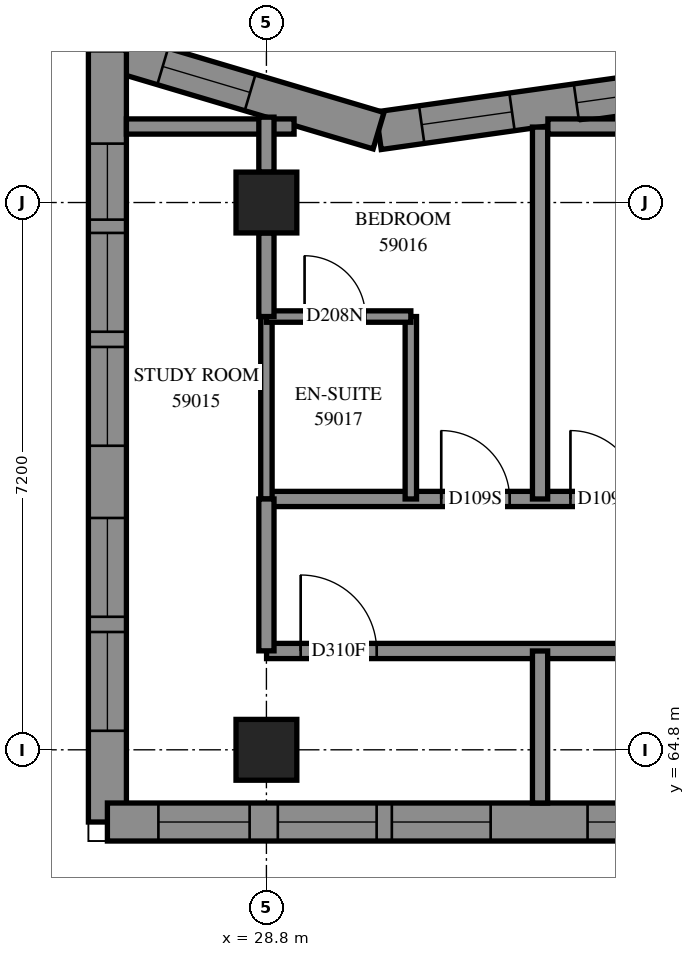
"""IFC4 building model, lengths in metres.
Left out: names, types, materials, properties, quantities, classifications, styles, units other than length and angle.
Written with IfcOpenShell. Run it as: python <this file> out.ifc"""

import sys

from ifc_helpers import new_model, si_unit, direction, frame, frame_2d, origin, origin_2d, place, context, subcontext, project, spatial, polyline, rectangle, outline, extrude, element, fill, save


model = new_model("IFC4")
c1 = context("Model", 3, precision=1e-05, world=origin(), true_north=direction((0.0, 1.0)))
c2 = subcontext(c1, "Body", "Model", "MODEL_VIEW")
j1 = project(units=[si_unit("LENGTHUNIT", "METRE"), si_unit("PLANEANGLEUNIT", "RADIAN")], contexts=[c1])
p1 = place(None, origin())
s1 = spatial("IfcSite", under=j1, at=p1, CompositionType="ELEMENT")
p2 = place(p1, origin())
s2 = spatial("IfcBuilding", under=s1, at=p2, CompositionType="ELEMENT")
p3 = place(p2, frame((0.0, 0.0, 216.8)))
s3 = spatial("IfcBuildingStorey", under=s2, at=p3, CompositionType="ELEMENT", Elevation=216.8)
for number, where, z_axis, x_axis in (
    (1, (28.8, 64.8, 0.0), (0.0, 0.0, 1.0), (1.0, 0.0, 0.0)),
    (2, (28.8, 72.0, 0.0), (0.0, 0.0, 1.0), (1.0, 0.0, 0.0)),
):
    element("IfcColumn", number, at=place(p3, frame(where, z_axis=z_axis, x_axis=x_axis)), inside=s3, PredefinedType="COLUMN", context=c2, shape_type="SweptSolid", body=[
        extrude(rectangle(XDim=0.8, YDim=0.8, at=origin_2d()), origin(), (0.0, 0.0, 1.0), 3.1),
    ])
p4 = place(p3, frame((34.131, 73.49, 0.0), z_axis=(0.0, 0.0, 1.0), x_axis=(-0.9901681239, -0.1398824019, 0.0)))
e3 = element("IfcWall", 3, at=p4, inside=s3, PredefinedType="SOLIDWALL", context=c2, shape_type="SweptSolid", body=[
    extrude(outline(polyline([(-0.035, -0.25), (3.839, -0.25), (3.949, 0.25), (0.035, 0.25), (-0.035, -0.25)])), origin(), (0.0, 0.0, 1.0), 3.1),
])
p5 = place(p4, frame((2.121, 0.0, 0.45)))
e4 = element("IfcOpeningElement", 4, at=p5, cuts=e3, PredefinedType="OPENING", context=c2, shape_type="SweptSolid", body=[
    extrude(rectangle(XDim=1.2, YDim=2.5, at=frame_2d((0.6, 1.25))), frame((0.0, 0.26, 0.0), z_axis=(0.0, -1.0, 0.0), x_axis=(1.0, 0.0, 0.0)), (0.0, 0.0, 1.0), 0.52),
])
p6 = place(p4, frame((0.465, 0.0, 0.45)))
e5 = element("IfcOpeningElement", 5, at=p6, cuts=e3, PredefinedType="OPENING", context=c2, shape_type="SweptSolid", body=[
    extrude(rectangle(XDim=0.8, YDim=2.5, at=frame_2d((0.4, 1.25))), frame((0.0, 0.26, 0.0), z_axis=(0.0, -1.0, 0.0), x_axis=(1.0, 0.0, 0.0)), (0.0, 0.0, 1.0), 0.52),
])
p7 = place(p3, frame((30.276, 72.945, 0.0), z_axis=(0.0, 0.0, 1.0), x_axis=(-0.9584414972, 0.2852891453, 0.0)))
e6 = element("IfcWall", 6, at=p7, inside=s3, PredefinedType="SOLIDWALL", context=c2, shape_type="SweptSolid", body=[
    extrude(outline(polyline([(0.054, -0.25), (4.058, -0.25), (3.387, 0.25), (-0.054, 0.25), (0.054, -0.25)])), origin(), (0.0, 0.0, 1.0), 3.1),
])
p8 = place(p7, frame((1.763, 0.0, 0.45)))
e7 = element("IfcOpeningElement", 7, at=p8, cuts=e6, PredefinedType="OPENING", context=c2, shape_type="SweptSolid", body=[
    extrude(rectangle(XDim=1.2, YDim=2.5, at=frame_2d((0.6, 1.25))), frame((0.0, 0.26, 0.0), z_axis=(0.0, -1.0, 0.0), x_axis=(1.0, 0.0, 0.0)), (0.0, 0.0, 1.0), 0.52),
])
p9 = place(p3, frame((26.708, 74.007, 0.0), z_axis=(0.0, 0.0, 1.0), x_axis=(0.0, -1.0, 0.0)))
e8 = element("IfcWall", 8, at=p9, inside=s3, PredefinedType="SOLIDWALL", context=c2, shape_type="SweptSolid", body=[
    extrude(outline(polyline([(-0.335, -0.25), (10.407, -0.25), (9.907, 0.25), (0.335, 0.25), (-0.335, -0.25)])), origin(), (0.0, 0.0, 1.0), 3.1),
])
p10 = place(p9, frame((2.407, 0.0, 0.45)))
e9 = element("IfcOpeningElement", 9, at=p10, cuts=e8, PredefinedType="OPENING", context=c2, shape_type="SweptSolid", body=[
    extrude(rectangle(XDim=1.3, YDim=2.5, at=frame_2d((0.65, 1.25))), frame((0.0, 0.26, 0.0), z_axis=(0.0, -1.0, 0.0), x_axis=(1.0, 0.0, 0.0)), (0.0, 0.0, 1.0), 0.52),
])
p11 = place(p9, frame((3.907, 0.0, 0.45)))
e10 = element("IfcOpeningElement", 10, at=p11, cuts=e8, PredefinedType="OPENING", context=c2, shape_type="SweptSolid", body=[
    extrude(rectangle(XDim=1.3, YDim=2.5, at=frame_2d((0.65, 1.25))), frame((0.0, 0.26, 0.0), z_axis=(0.0, -1.0, 0.0), x_axis=(1.0, 0.0, 0.0)), (0.0, 0.0, 1.0), 0.52),
])
p12 = place(p9, frame((6.157, 0.0, 0.45)))
e11 = element("IfcOpeningElement", 11, at=p12, cuts=e8, PredefinedType="OPENING", context=c2, shape_type="SweptSolid", body=[
    extrude(rectangle(XDim=1.3, YDim=2.5, at=frame_2d((0.65, 1.25))), frame((0.0, 0.26, 0.0), z_axis=(0.0, -1.0, 0.0), x_axis=(1.0, 0.0, 0.0)), (0.0, 0.0, 1.0), 0.52),
])
p13 = place(p9, frame((7.657, 0.0, 0.45)))
e12 = element("IfcOpeningElement", 12, at=p13, cuts=e8, PredefinedType="OPENING", context=c2, shape_type="SweptSolid", body=[
    extrude(rectangle(XDim=1.3, YDim=2.5, at=frame_2d((0.65, 1.25))), frame((0.0, 0.26, 0.0), z_axis=(0.0, -1.0, 0.0), x_axis=(1.0, 0.0, 0.0)), (0.0, 0.0, 1.0), 0.52),
])
p14 = place(p9, frame((1.232, 0.0, 0.45)))
e13 = element("IfcOpeningElement", 13, at=p14, cuts=e8, PredefinedType="OPENING", context=c2, shape_type="SweptSolid", body=[
    extrude(rectangle(XDim=1.0, YDim=2.5, at=frame_2d((0.5, 1.25))), frame((0.0, 0.26, 0.0), z_axis=(0.0, -1.0, 0.0), x_axis=(1.0, 0.0, 0.0)), (0.0, 0.0, 1.0), 0.52),
])
p15 = place(p3, frame((26.708, 63.85, 0.0), z_axis=(0.0, 0.0, 1.0), x_axis=(1.0, 0.0, 0.0)))
e14 = element("IfcWall", 14, at=p15, inside=s3, PredefinedType="SOLIDWALL", context=c2, shape_type="SweptSolid", body=[
    extrude(outline(polyline([(-0.25, -0.25), (8.092, -0.25), (8.592, 0.25), (0.25, 0.25), (-0.25, -0.25)])), origin(), (0.0, 0.0, 1.0), 3.1),
])
p16 = place(p15, frame((2.242, 0.0, 0.45)))
e15 = element("IfcOpeningElement", 15, at=p16, cuts=e14, PredefinedType="OPENING", context=c2, shape_type="SweptSolid", body=[
    extrude(rectangle(XDim=1.3, YDim=2.5, at=frame_2d((0.65, 1.25))), frame((0.0, 0.26, 0.0), z_axis=(0.0, -1.0, 0.0), x_axis=(1.0, 0.0, 0.0)), (0.0, 0.0, 1.0), 0.52),
])
p17 = place(p15, frame((3.742, 0.0, 0.45)))
e16 = element("IfcOpeningElement", 16, at=p17, cuts=e14, PredefinedType="OPENING", context=c2, shape_type="SweptSolid", body=[
    extrude(rectangle(XDim=1.3, YDim=2.5, at=frame_2d((0.65, 1.25))), frame((0.0, 0.26, 0.0), z_axis=(0.0, -1.0, 0.0), x_axis=(1.0, 0.0, 0.0)), (0.0, 0.0, 1.0), 0.52),
])
p18 = place(p15, frame((0.671, 0.0, 0.45)))
e17 = element("IfcOpeningElement", 17, at=p18, cuts=e14, PredefinedType="OPENING", context=c2, shape_type="SweptSolid", body=[
    extrude(rectangle(XDim=1.2, YDim=2.5, at=frame_2d((0.6, 1.25))), frame((0.0, 0.26, 0.0), z_axis=(0.0, -1.0, 0.0), x_axis=(1.0, 0.0, 0.0)), (0.0, 0.0, 1.0), 0.52),
])
p19 = place(p15, frame((6.317, 0.0, 0.45)))
e18 = element("IfcOpeningElement", 18, at=p19, cuts=e14, PredefinedType="OPENING", context=c2, shape_type="SweptSolid", body=[
    extrude(rectangle(XDim=1.2, YDim=2.5, at=frame_2d((0.6, 1.25))), frame((0.0, 0.26, 0.0), z_axis=(0.0, -1.0, 0.0), x_axis=(1.0, 0.0, 0.0)), (0.0, 0.0, 1.0), 0.52),
])
p20 = place(p3, frame((28.8, 68.1, 0.0), z_axis=(0.0, 0.0, 1.0), x_axis=(1.0, 0.0, 0.0)))
e19 = element("IfcWall", 19, at=p20, inside=s3, PredefinedType="PARTITIONING", context=c2, shape_type="SweptSolid", body=[
    extrude(rectangle(XDim=11.8, YDim=0.2, at=frame_2d((5.9, 0.0))), origin(), (0.0, 0.0, 1.0), 3.1),
])
p21 = place(p20, frame((2.3, 0.0, 0.0)))
e20 = element("IfcOpeningElement", 20, at=p21, cuts=e19, PredefinedType="OPENING", context=c2, shape_type="SweptSolid", body=[
    extrude(rectangle(XDim=0.9, YDim=2.1, at=frame_2d((0.45, 1.05))), frame((0.0, 0.11, 0.0), z_axis=(0.0, -1.0, 0.0), x_axis=(1.0, 0.0, 0.0)), (0.0, 0.0, 1.0), 0.22),
])
p22 = place(p20, frame((4.0, 0.0, 0.0)))
e21 = element("IfcOpeningElement", 21, at=p22, cuts=e19, PredefinedType="OPENING", context=c2, shape_type="SweptSolid", body=[
    extrude(rectangle(XDim=0.9, YDim=2.1, at=frame_2d((0.45, 1.05))), frame((0.0, 0.11, 0.0), z_axis=(0.0, -1.0, 0.0), x_axis=(1.0, 0.0, 0.0)), (0.0, 0.0, 1.0), 0.22),
])
p23 = place(p20, frame((9.5, 0.0, 0.0)))
e22 = element("IfcOpeningElement", 22, at=p23, cuts=e19, PredefinedType="OPENING", context=c2, shape_type="SweptSolid", body=[
    extrude(rectangle(XDim=0.9, YDim=2.1, at=frame_2d((0.45, 1.05))), frame((0.0, 0.11, 0.0), z_axis=(0.0, -1.0, 0.0), x_axis=(1.0, 0.0, 0.0)), (0.0, 0.0, 1.0), 0.22),
])
p24 = place(p3, frame((28.802, 66.1, 0.0), z_axis=(0.0, 0.0, 1.0), x_axis=(1.0, 0.0, 0.0)))
e23 = element("IfcWall", 23, at=p24, inside=s3, PredefinedType="PARTITIONING", context=c2, shape_type="SweptSolid", body=[
    extrude(rectangle(XDim=9.798, YDim=0.2, at=frame_2d((4.899, 0.0))), origin(), (0.0, 0.0, 1.0), 3.1),
])
p25 = place(p24, frame((0.449, 0.0, 0.0)))
e24 = element("IfcOpeningElement", 24, at=p25, cuts=e23, PredefinedType="OPENING", context=c2, shape_type="SweptSolid", body=[
    extrude(rectangle(XDim=1.0, YDim=2.1, at=frame_2d((0.5, 1.05))), frame((0.0, 0.11, 0.0), z_axis=(0.0, -1.0, 0.0), x_axis=(1.0, 0.0, 0.0)), (0.0, 0.0, 1.0), 0.22),
])
p26 = place(p24, frame((5.459, 0.0, 0.0)))
e25 = element("IfcOpeningElement", 25, at=p26, cuts=e23, PredefinedType="OPENING", context=c2, shape_type="SweptSolid", body=[
    extrude(rectangle(XDim=1.0, YDim=2.1, at=frame_2d((0.5, 1.05))), frame((0.0, 0.11, 0.0), z_axis=(0.0, -1.0, 0.0), x_axis=(1.0, 0.0, 0.0)), (0.0, 0.0, 1.0), 0.22),
])
p27 = place(p3, frame((32.4, 68.1, 0.0), z_axis=(0.0, 0.0, 1.0), x_axis=(0.0, 1.0, 0.0)))
e26 = element("IfcWall", 26, at=p27, inside=s3, PredefinedType="PARTITIONING", context=c2, shape_type="SweptSolid", body=[
    extrude(rectangle(XDim=4.893, YDim=0.2, at=frame_2d((2.446, 0.0))), origin(), (0.0, 0.0, 1.0), 3.1),
])
p28 = place(p3, frame((32.503, 73.0, 0.0), z_axis=(0.0, 0.0, 1.0), x_axis=(1.0, 0.0, 0.0)))
e27 = element("IfcWall", 27, at=p28, inside=s3, PredefinedType="PARTITIONING", context=c2, shape_type="SweptSolid", body=[
    extrude(rectangle(XDim=3.256, YDim=0.2, at=frame_2d((1.628, 0.0))), origin(), (0.0, 0.0, 1.0), 3.1),
])
p29 = place(p3, frame((28.8, 68.1, 0.0), z_axis=(0.0, 0.0, 1.0), x_axis=(0.0, 1.0, 0.0)))
e28 = element("IfcWall", 28, at=p29, inside=s3, PredefinedType="PARTITIONING", context=c2, shape_type="SweptSolid", body=[
    extrude(rectangle(XDim=2.4, YDim=0.15, at=frame_2d((1.2, 0.0))), origin(), (0.0, 0.0, 1.0), 2.6),
])
p30 = place(p3, frame((30.7, 68.1, 0.0), z_axis=(0.0, 0.0, 1.0), x_axis=(0.0, 1.0, 0.0)))
e29 = element("IfcWall", 29, at=p30, inside=s3, PredefinedType="PARTITIONING", context=c2, shape_type="SweptSolid", body=[
    extrude(rectangle(XDim=2.4, YDim=0.15, at=frame_2d((1.2, 0.0))), origin(), (0.0, 0.0, 1.0), 3.1),
])
p31 = place(p3, frame((26.958, 73.0, 0.0), z_axis=(0.0, 0.0, 1.0), x_axis=(1.0, 0.0, 0.0)))
e30 = element("IfcWall", 30, at=p31, inside=s3, PredefinedType="PARTITIONING", context=c2, shape_type="SweptSolid", body=[
    extrude(rectangle(XDim=2.206, YDim=0.2, at=frame_2d((1.103, 0.0))), origin(), (0.0, 0.0, 1.0), 3.1),
])
p32 = place(p3, frame((28.8, 66.102, 0.0), z_axis=(0.0, 0.0, 1.0), x_axis=(0.0, 1.0, 0.0)))
e31 = element("IfcWall", 31, at=p32, inside=s3, PredefinedType="PARTITIONING", context=c2, shape_type="SweptSolid", body=[
    extrude(rectangle(XDim=1.998, YDim=0.2, at=frame_2d((0.999, 0.0))), origin(), (0.0, 0.0, 1.0), 2.6),
])
p33 = place(p3, frame((32.4, 64.1, 0.0), z_axis=(0.0, 0.0, 1.0), x_axis=(0.0, 1.0, 0.0)))
e32 = element("IfcWall", 32, at=p33, inside=s3, PredefinedType="PARTITIONING", context=c2, shape_type="SweptSolid", body=[
    extrude(rectangle(XDim=2.0, YDim=0.2, at=frame_2d((1.0, 0.0))), origin(), (0.0, 0.0, 1.0), 3.1),
])
p34 = place(p3, frame((28.8, 70.5, 0.0), z_axis=(0.0, 0.0, 1.0), x_axis=(1.0, 0.0, 0.0)))
e33 = element("IfcWall", 33, at=p34, inside=s3, PredefinedType="PARTITIONING", context=c2, shape_type="SweptSolid", body=[
    extrude(rectangle(XDim=1.9, YDim=0.15, at=frame_2d((0.95, 0.0))), origin(), (0.0, 0.0, 1.0), 3.1),
])
p35 = place(p34, frame((0.502, 0.0, 0.0)))
e34 = element("IfcOpeningElement", 34, at=p35, cuts=e33, PredefinedType="OPENING", context=c2, shape_type="SweptSolid", body=[
    extrude(rectangle(XDim=0.8, YDim=2.1, at=frame_2d((0.4, 1.05))), frame((0.0, 0.085, 0.0), z_axis=(0.0, -1.0, 0.0), x_axis=(1.0, 0.0, 0.0)), (0.0, 0.0, 1.0), 0.17),
])
p36 = place(p3, frame((28.8, 70.5, 0.0), z_axis=(0.0, 0.0, 1.0), x_axis=(0.0, 1.0, 0.0)))
e35 = element("IfcWall", 35, at=p36, inside=s3, PredefinedType="PARTITIONING", context=c2, shape_type="SweptSolid", body=[
    extrude(rectangle(XDim=1.1, YDim=0.2, at=frame_2d((0.55, 0.0))), origin(), (0.0, 0.0, 1.0), 2.6),
])
p37 = place(p3, frame((28.8, 72.4, 0.0), z_axis=(0.0, 0.0, 1.0), x_axis=(0.0, 1.0, 0.0)))
e36 = element("IfcWall", 36, at=p37, inside=s3, PredefinedType="PARTITIONING", context=c2, shape_type="SweptSolid", body=[
    extrude(rectangle(XDim=0.723, YDim=0.2, at=frame_2d((0.362, 0.0))), origin(), (0.0, 0.0, 1.0), 3.1),
])
p38 = place(p5, origin())
e37 = element("IfcWindow", 37, at=p38, inside=s3, PartitioningType="SINGLE_PANEL", PredefinedType="WINDOW", context=c2, shape_type="SweptSolid", body=[
    extrude(rectangle(XDim=1.2, YDim=2.5, at=frame_2d((0.6, 1.25))), frame((0.0, 0.18, 0.0), z_axis=(0.0, -1.0, 0.0), x_axis=(1.0, 0.0, 0.0)), (0.0, 0.0, 1.0), 0.06),
])
fill(e4, e37)
p39 = place(p8, origin())
e38 = element("IfcWindow", 38, at=p39, inside=s3, PartitioningType="SINGLE_PANEL", PredefinedType="WINDOW", context=c2, shape_type="SweptSolid", body=[
    extrude(rectangle(XDim=1.2, YDim=2.5, at=frame_2d((0.6, 1.25))), frame((0.0, 0.18, 0.0), z_axis=(0.0, -1.0, 0.0), x_axis=(1.0, 0.0, 0.0)), (0.0, 0.0, 1.0), 0.06),
])
fill(e7, e38)
p40 = place(p10, origin())
e39 = element("IfcWindow", 39, at=p40, inside=s3, PartitioningType="SINGLE_PANEL", PredefinedType="WINDOW", context=c2, shape_type="SweptSolid", body=[
    extrude(rectangle(XDim=1.3, YDim=2.5, at=frame_2d((0.65, 1.25))), frame((0.0, 0.18, 0.0), z_axis=(0.0, -1.0, 0.0), x_axis=(1.0, 0.0, 0.0)), (0.0, 0.0, 1.0), 0.06),
])
fill(e9, e39)
p41 = place(p11, origin())
e40 = element("IfcWindow", 40, at=p41, inside=s3, PartitioningType="SINGLE_PANEL", PredefinedType="WINDOW", context=c2, shape_type="SweptSolid", body=[
    extrude(rectangle(XDim=1.3, YDim=2.5, at=frame_2d((0.65, 1.25))), frame((0.0, 0.18, 0.0), z_axis=(0.0, -1.0, 0.0), x_axis=(1.0, 0.0, 0.0)), (0.0, 0.0, 1.0), 0.06),
])
fill(e10, e40)
p42 = place(p12, origin())
e41 = element("IfcWindow", 41, at=p42, inside=s3, PartitioningType="SINGLE_PANEL", PredefinedType="WINDOW", context=c2, shape_type="SweptSolid", body=[
    extrude(rectangle(XDim=1.3, YDim=2.5, at=frame_2d((0.65, 1.25))), frame((0.0, 0.18, 0.0), z_axis=(0.0, -1.0, 0.0), x_axis=(1.0, 0.0, 0.0)), (0.0, 0.0, 1.0), 0.06),
])
fill(e11, e41)
p43 = place(p13, origin())
e42 = element("IfcWindow", 42, at=p43, inside=s3, PartitioningType="SINGLE_PANEL", PredefinedType="WINDOW", context=c2, shape_type="SweptSolid", body=[
    extrude(rectangle(XDim=1.3, YDim=2.5, at=frame_2d((0.65, 1.25))), frame((0.0, 0.18, 0.0), z_axis=(0.0, -1.0, 0.0), x_axis=(1.0, 0.0, 0.0)), (0.0, 0.0, 1.0), 0.06),
])
fill(e12, e42)
p44 = place(p16, origin())
e43 = element("IfcWindow", 43, at=p44, inside=s3, PartitioningType="SINGLE_PANEL", PredefinedType="WINDOW", context=c2, shape_type="SweptSolid", body=[
    extrude(rectangle(XDim=1.3, YDim=2.5, at=frame_2d((0.65, 1.25))), frame((0.0, 0.18, 0.0), z_axis=(0.0, -1.0, 0.0), x_axis=(1.0, 0.0, 0.0)), (0.0, 0.0, 1.0), 0.06),
])
fill(e15, e43)
p45 = place(p17, origin())
e44 = element("IfcWindow", 44, at=p45, inside=s3, PartitioningType="SINGLE_PANEL", PredefinedType="WINDOW", context=c2, shape_type="SweptSolid", body=[
    extrude(rectangle(XDim=1.3, YDim=2.5, at=frame_2d((0.65, 1.25))), frame((0.0, 0.18, 0.0), z_axis=(0.0, -1.0, 0.0), x_axis=(1.0, 0.0, 0.0)), (0.0, 0.0, 1.0), 0.06),
])
fill(e16, e44)
p46 = place(p18, origin())
e45 = element("IfcWindow", 45, at=p46, inside=s3, PartitioningType="SINGLE_PANEL", PredefinedType="WINDOW", context=c2, shape_type="SweptSolid", body=[
    extrude(rectangle(XDim=1.2, YDim=2.5, at=frame_2d((0.6, 1.25))), frame((0.0, 0.18, 0.0), z_axis=(0.0, -1.0, 0.0), x_axis=(1.0, 0.0, 0.0)), (0.0, 0.0, 1.0), 0.06),
])
fill(e17, e45)
p47 = place(p19, origin())
e46 = element("IfcWindow", 46, at=p47, inside=s3, PartitioningType="SINGLE_PANEL", PredefinedType="WINDOW", context=c2, shape_type="SweptSolid", body=[
    extrude(rectangle(XDim=1.2, YDim=2.5, at=frame_2d((0.6, 1.25))), frame((0.0, 0.18, 0.0), z_axis=(0.0, -1.0, 0.0), x_axis=(1.0, 0.0, 0.0)), (0.0, 0.0, 1.0), 0.06),
])
fill(e18, e46)
p48 = place(p25, origin())
e47 = element("IfcDoor", 47, at=p48, inside=s3, OperationType="SINGLE_SWING_LEFT", PredefinedType="DOOR", context=c2, shape_type="SweptSolid", body=[
    extrude(rectangle(XDim=1.0, YDim=2.1, at=frame_2d((0.5, 1.05))), frame((0.0, 0.025, 0.0), z_axis=(0.0, -1.0, 0.0), x_axis=(1.0, 0.0, 0.0)), (0.0, 0.0, 1.0), 0.05),
])
fill(e24, e47)
p49 = place(p21, origin())
e48 = element("IfcDoor", 48, at=p49, inside=s3, OperationType="SINGLE_SWING_RIGHT", PredefinedType="DOOR", context=c2, shape_type="SweptSolid", body=[
    extrude(rectangle(XDim=0.9, YDim=2.1, at=frame_2d((0.45, 1.05))), frame((0.0, 0.025, 0.0), z_axis=(0.0, -1.0, 0.0), x_axis=(1.0, 0.0, 0.0)), (0.0, 0.0, 1.0), 0.05),
])
fill(e20, e48)
p50 = place(p35, origin())
e49 = element("IfcDoor", 49, at=p50, inside=s3, OperationType="SINGLE_SWING_RIGHT", PredefinedType="DOOR", context=c2, shape_type="SweptSolid", body=[
    extrude(rectangle(XDim=0.8, YDim=2.1, at=frame_2d((0.4, 1.05))), frame((0.0, 0.025, 0.0), z_axis=(0.0, -1.0, 0.0), x_axis=(1.0, 0.0, 0.0)), (0.0, 0.0, 1.0), 0.05),
])
fill(e34, e49)
p51 = place(p22, origin())
e50 = element("IfcDoor", 50, at=p51, inside=s3, OperationType="SINGLE_SWING_LEFT", PredefinedType="DOOR", context=c2, shape_type="SweptSolid", body=[
    extrude(rectangle(XDim=0.9, YDim=2.1, at=frame_2d((0.45, 1.05))), frame((0.0, 0.025, 0.0), z_axis=(0.0, -1.0, 0.0), x_axis=(1.0, 0.0, 0.0)), (0.0, 0.0, 1.0), 0.05),
])
fill(e21, e50)
p52 = place(p6, origin())
e51 = element("IfcWindow", 51, at=p52, inside=s3, PartitioningType="SINGLE_PANEL", PredefinedType="WINDOW", context=c2, shape_type="SweptSolid", body=[
    extrude(rectangle(XDim=0.8, YDim=2.5, at=frame_2d((0.4, 1.25))), frame((0.0, 0.18, 0.0), z_axis=(0.0, -1.0, 0.0), x_axis=(1.0, 0.0, 0.0)), (0.0, 0.0, 1.0), 0.06),
])
fill(e5, e51)
p53 = place(p14, origin())
e52 = element("IfcWindow", 52, at=p53, inside=s3, PartitioningType="SINGLE_PANEL", PredefinedType="WINDOW", context=c2, shape_type="SweptSolid", body=[
    extrude(rectangle(XDim=1.0, YDim=2.5, at=frame_2d((0.5, 1.25))), frame((0.0, 0.18, 0.0), z_axis=(0.0, -1.0, 0.0), x_axis=(1.0, 0.0, 0.0)), (0.0, 0.0, 1.0), 0.06),
])
fill(e13, e52)
save(model, sys.argv[1])
